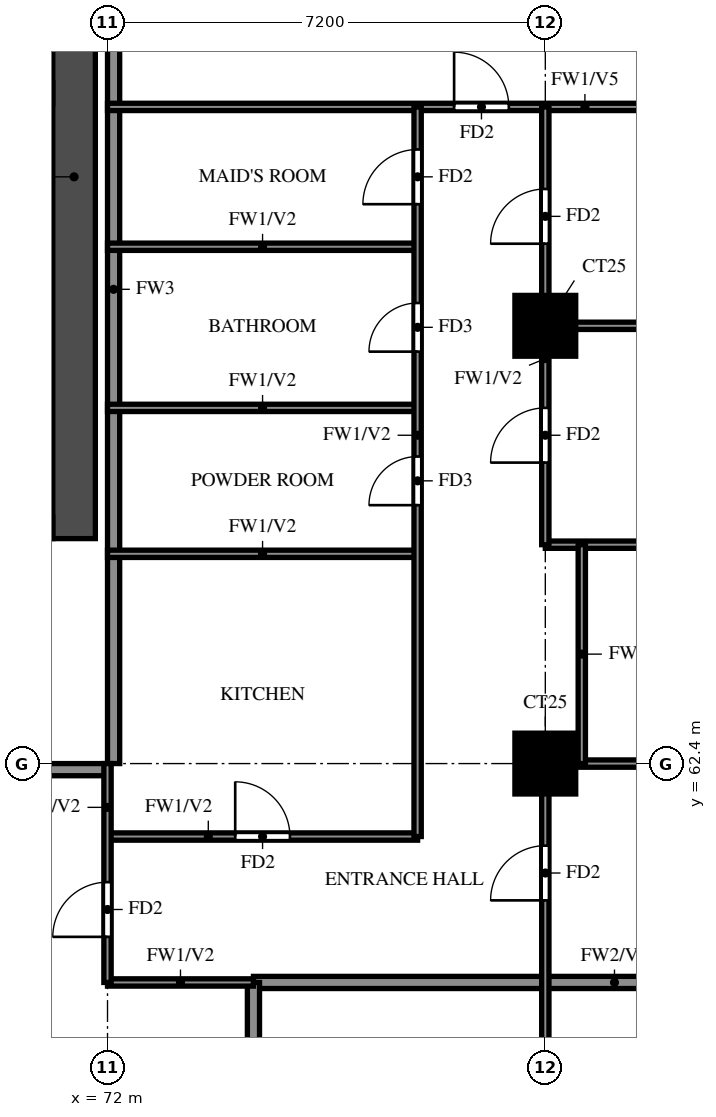
"""IFC4 building model, lengths in metres.
Left out: names, types, materials, properties, quantities, classifications, styles, units other than length and angle.
Written with IfcOpenShell. Run it as: python <this file> out.ifc"""

import sys

from ifc_helpers import new_model, si_unit, direction, frame, frame_2d, origin, origin_2d, place, context, subcontext, project, spatial, rectangle, extrude, source, transform, mapped, element, fill, save


model = new_model("IFC4")
c1 = context("Model", 3, precision=1e-05, world=origin(), true_north=direction((0.0, 1.0)))
c2 = subcontext(c1, "Body", "Model", "MODEL_VIEW")
j1 = project(units=[si_unit("LENGTHUNIT", "METRE"), si_unit("PLANEANGLEUNIT", "RADIAN")], contexts=[c1])
p1 = place(None, origin())
s1 = spatial("IfcSite", under=j1, at=p1, CompositionType="ELEMENT")
p2 = place(p1, origin())
s2 = spatial("IfcBuilding", under=s1, at=p2, CompositionType="ELEMENT")
p3 = place(p2, frame((0.0, 0.0, 143.0)))
s3 = spatial("IfcBuildingStorey", under=s2, at=p3, CompositionType="ELEMENT", Elevation=143.0)
m1 = source(origin(), c2, "Body", "SweptSolid", [
    extrude(rectangle(XDim=1.0, YDim=1.0, at=origin_2d()), origin(), (0.0, 0.0, 1.0), 3.2),
])
for number, where, z_axis, x_axis in (
    (1, (79.2, 62.4, 0.0), (0.0, 0.0, 1.0), (1.0, 0.0, 0.0)),
    (2, (79.2, 69.6, 0.0), (0.0, 0.0, 1.0), (1.0, 0.0, 0.0)),
):
    element("IfcColumn", number, at=place(p3, frame(where, z_axis=z_axis, x_axis=x_axis)), inside=s3, PredefinedType="COLUMN", context=c2, shape_type="MappedRepresentation", body=[
        mapped(m1, transform((0.0, 0.0, 0.0))),
    ])
p4 = place(p3, frame((71.45, 66.1, 0.0), z_axis=(0.0, 0.0, 1.0), x_axis=(0.0, 1.0, 0.0)))
e3 = element("IfcWall", 3, at=p4, inside=s3, PredefinedType="SHEAR", context=c2, shape_type="SweptSolid", body=[
    extrude(rectangle(XDim=11.9, YDim=0.7, at=frame_2d((5.95, 0.0))), origin(), (0.0, 0.0, 1.0), 3.2),
])
p5 = place(p3, frame((29.7, 66.275, 0.0), z_axis=(0.0, 0.0, 1.0), x_axis=(1.0, 0.0, 0.0)))
e4 = element("IfcWall", 4, at=p5, inside=s3, PredefinedType="SHEAR", context=c2, shape_type="SweptSolid", body=[
    extrude(rectangle(XDim=41.4, YDim=0.35, at=frame_2d((20.7, 0.0))), origin(), (0.0, 0.0, 1.0), 3.2),
])
p6 = place(p5, frame((0.925, 0.0, 0.0)))
e5 = element("IfcOpeningElement", 5, at=p6, cuts=e4, PredefinedType="OPENING", context=c2, shape_type="SweptSolid", body=[
    extrude(rectangle(XDim=1.1, YDim=2.1, at=frame_2d((0.55, 1.05))), frame((0.0, 0.185, 0.0), z_axis=(0.0, -1.0, 0.0), x_axis=(1.0, 0.0, 0.0)), (0.0, 0.0, 1.0), 0.37),
])
p7 = place(p5, frame((3.712, 0.0, 0.0)))
e6 = element("IfcOpeningElement", 6, at=p7, cuts=e4, PredefinedType="OPENING", context=c2, shape_type="SweptSolid", body=[
    extrude(rectangle(XDim=1.8, YDim=2.1, at=frame_2d((0.9, 1.05))), frame((0.0, 0.185, 0.0), z_axis=(0.0, -1.0, 0.0), x_axis=(1.0, 0.0, 0.0)), (0.0, 0.0, 1.0), 0.37),
])
p8 = place(p3, frame((67.2, 62.3, 0.0), z_axis=(0.0, 0.0, 1.0), x_axis=(1.0, 0.0, 0.0)))
e7 = element("IfcWall", 7, at=p8, inside=s3, PredefinedType="SOLIDWALL", context=c2, shape_type="SweptSolid", body=[
    extrude(rectangle(XDim=4.8, YDim=0.2, at=frame_2d((2.4, 0.0))), origin(), (0.0, 0.0, 1.0), 3.2),
])
p9 = place(p3, frame((72.1, 62.4, 0.0), z_axis=(0.0, 0.0, 1.0), x_axis=(0.0, 1.0, 0.0)))
e8 = element("IfcWall", 8, at=p9, inside=s3, PredefinedType="SOLIDWALL", context=c2, shape_type="SweptSolid", body=[
    extrude(rectangle(XDim=15.6, YDim=0.2, at=frame_2d((7.8, 0.0))), origin(), (0.0, 0.0, 1.0), 3.2),
])
p10 = place(p3, frame((74.4, 58.8, 0.0), z_axis=(0.0, 0.0, 1.0), x_axis=(1.0, 0.0, 0.0)))
e9 = element("IfcWall", 9, at=p10, inside=s3, PredefinedType="SOLIDWALL", context=c2, shape_type="SweptSolid", body=[
    extrude(rectangle(XDim=11.875, YDim=0.2, at=frame_2d((5.938, 0.0))), origin(), (0.0, 0.0, 1.0), 2.3),
])
p11 = place(p3, frame((74.4, 56.4, 0.0), z_axis=(0.0, 0.0, 1.0), x_axis=(0.0, 1.0, 0.0)))
e10 = element("IfcWall", 10, at=p11, inside=s3, PredefinedType="SOLIDWALL", context=c2, shape_type="SweptSolid", body=[
    extrude(rectangle(XDim=2.4, YDim=0.2, at=frame_2d((1.2, 0.0))), origin(), (0.0, 0.0, 1.0), 3.2),
])
p12 = place(p3, frame((72.0, 58.8, 0.0), z_axis=(0.0, 0.0, 1.0), x_axis=(1.0, 0.0, 0.0)))
e11 = element("IfcWall", 11, at=p12, inside=s3, PredefinedType="PARTITIONING", context=c2, shape_type="SweptSolid", body=[
    extrude(rectangle(XDim=2.4, YDim=0.12, at=frame_2d((1.2, 0.0))), origin(), (0.0, 0.0, 1.0), 3.2),
])
p13 = place(p3, frame((72.0, 61.2, 0.0), z_axis=(0.0, 0.0, 1.0), x_axis=(1.0, 0.0, 0.0)))
e12 = element("IfcWall", 12, at=p13, inside=s3, PredefinedType="PARTITIONING", context=c2, shape_type="SweptSolid", body=[
    extrude(rectangle(XDim=5.1, YDim=0.12, at=frame_2d((2.55, 0.0))), origin(), (0.0, 0.0, 1.0), 3.2),
])
p14 = place(p13, frame((2.1, 0.0, 0.0)))
e13 = element("IfcOpeningElement", 13, at=p14, cuts=e12, PredefinedType="OPENING", context=c2, shape_type="SweptSolid", body=[
    extrude(rectangle(XDim=0.9, YDim=2.1, at=frame_2d((0.45, 1.05))), frame((0.0, 0.07, 0.0), z_axis=(0.0, -1.0, 0.0), x_axis=(1.0, 0.0, 0.0)), (0.0, 0.0, 1.0), 0.14),
])
p15 = place(p3, frame((79.2, 62.4, 0.0), z_axis=(0.0, 0.0, 1.0), x_axis=(1.0, 0.0, 0.0)))
e14 = element("IfcWall", 14, at=p15, inside=s3, PredefinedType="PARTITIONING", context=c2, shape_type="SweptSolid", body=[
    extrude(rectangle(XDim=7.075, YDim=0.12, at=frame_2d((3.538, 0.0))), origin(), (0.0, 0.0, 1.0), 3.2),
])
p16 = place(p15, frame((3.438, 0.0, 0.0)))
e15 = element("IfcOpeningElement", 15, at=p16, cuts=e14, PredefinedType="OPENING", context=c2, shape_type="SweptSolid", body=[
    extrude(rectangle(XDim=0.8, YDim=2.1, at=frame_2d((0.4, 1.05))), frame((0.0, 0.07, 0.0), z_axis=(0.0, -1.0, 0.0), x_axis=(1.0, 0.0, 0.0)), (0.0, 0.0, 1.0), 0.14),
])
p17 = place(p3, frame((72.0, 65.85, 0.0), z_axis=(0.0, 0.0, 1.0), x_axis=(1.0, 0.0, 0.0)))
e16 = element("IfcWall", 16, at=p17, inside=s3, PredefinedType="PARTITIONING", context=c2, shape_type="SweptSolid", body=[
    extrude(rectangle(XDim=5.1, YDim=0.12, at=frame_2d((2.55, 0.0))), origin(), (0.0, 0.0, 1.0), 3.2),
])
p18 = place(p3, frame((79.2, 66.0, 0.0), z_axis=(0.0, 0.0, 1.0), x_axis=(1.0, 0.0, 0.0)))
e17 = element("IfcWall", 17, at=p18, inside=s3, PredefinedType="PARTITIONING", context=c2, shape_type="SweptSolid", body=[
    extrude(rectangle(XDim=7.075, YDim=0.12, at=frame_2d((3.538, 0.0))), origin(), (0.0, 0.0, 1.0), 2.3),
])
p19 = place(p3, frame((72.0, 68.25, 0.0), z_axis=(0.0, 0.0, 1.0), x_axis=(1.0, 0.0, 0.0)))
e18 = element("IfcWall", 18, at=p19, inside=s3, PredefinedType="PARTITIONING", context=c2, shape_type="SweptSolid", body=[
    extrude(rectangle(XDim=5.1, YDim=0.12, at=frame_2d((2.55, 0.0))), origin(), (0.0, 0.0, 1.0), 3.2),
])
p20 = place(p3, frame((79.2, 69.6, 0.0), z_axis=(0.0, 0.0, 1.0), x_axis=(1.0, 0.0, 0.0)))
e19 = element("IfcWall", 19, at=p20, inside=s3, PredefinedType="PARTITIONING", context=c2, shape_type="SweptSolid", body=[
    extrude(rectangle(XDim=7.075, YDim=0.12, at=frame_2d((3.538, 0.0))), origin(), (0.0, 0.0, 1.0), 3.2),
])
p21 = place(p3, frame((72.0, 70.9, 0.0), z_axis=(0.0, 0.0, 1.0), x_axis=(1.0, 0.0, 0.0)))
e20 = element("IfcWall", 20, at=p21, inside=s3, PredefinedType="PARTITIONING", context=c2, shape_type="SweptSolid", body=[
    extrude(rectangle(XDim=5.1, YDim=0.12, at=frame_2d((2.55, 0.0))), origin(), (0.0, 0.0, 1.0), 3.2),
])
p22 = place(p3, frame((72.0, 73.2, 0.0), z_axis=(0.0, 0.0, 1.0), x_axis=(1.0, 0.0, 0.0)))
e21 = element("IfcWall", 21, at=p22, inside=s3, PredefinedType="PARTITIONING", context=c2, shape_type="SweptSolid", body=[
    extrude(rectangle(XDim=14.275, YDim=0.12, at=frame_2d((7.137, 0.0))), origin(), (0.0, 0.0, 1.0), 2.3),
])
p23 = place(p22, frame((5.7, 0.0, 0.0)))
e22 = element("IfcOpeningElement", 22, at=p23, cuts=e21, PredefinedType="OPENING", context=c2, shape_type="SweptSolid", body=[
    extrude(rectangle(XDim=0.9, YDim=2.1, at=frame_2d((0.45, 1.05))), frame((0.0, 0.07, 0.0), z_axis=(0.0, -1.0, 0.0), x_axis=(1.0, 0.0, 0.0)), (0.0, 0.0, 1.0), 0.14),
])
p24 = place(p3, frame((72.0, 58.8, 0.0), z_axis=(0.0, 0.0, 1.0), x_axis=(0.0, 1.0, 0.0)))
e23 = element("IfcWall", 23, at=p24, inside=s3, PredefinedType="PARTITIONING", context=c2, shape_type="SweptSolid", body=[
    extrude(rectangle(XDim=3.6, YDim=0.12, at=frame_2d((1.8, 0.0))), origin(), (0.0, 0.0, 1.0), 3.2),
])
p25 = place(p24, frame((0.75, 0.0, 0.0)))
e24 = element("IfcOpeningElement", 24, at=p25, cuts=e23, PredefinedType="OPENING", context=c2, shape_type="SweptSolid", body=[
    extrude(rectangle(XDim=0.9, YDim=2.1, at=frame_2d((0.45, 1.05))), frame((0.0, 0.07, 0.0), z_axis=(0.0, -1.0, 0.0), x_axis=(1.0, 0.0, 0.0)), (0.0, 0.0, 1.0), 0.14),
])
p26 = place(p3, frame((77.1, 61.2, 0.0), z_axis=(0.0, 0.0, 1.0), x_axis=(0.0, 1.0, 0.0)))
e25 = element("IfcWall", 25, at=p26, inside=s3, PredefinedType="PARTITIONING", context=c2, shape_type="SweptSolid", body=[
    extrude(rectangle(XDim=12.0, YDim=0.12, at=frame_2d((6.0, 0.0))), origin(), (0.0, 0.0, 1.0), 3.2),
])
p27 = place(p26, frame((5.45, 0.0, 0.0)))
e26 = element("IfcOpeningElement", 26, at=p27, cuts=e25, PredefinedType="OPENING", context=c2, shape_type="SweptSolid", body=[
    extrude(rectangle(XDim=0.8, YDim=2.1, at=frame_2d((0.4, 1.05))), frame((0.0, 0.07, 0.0), z_axis=(0.0, -1.0, 0.0), x_axis=(1.0, 0.0, 0.0)), (0.0, 0.0, 1.0), 0.14),
])
p28 = place(p26, frame((7.975, 0.0, 0.0)))
e27 = element("IfcOpeningElement", 27, at=p28, cuts=e25, PredefinedType="OPENING", context=c2, shape_type="SweptSolid", body=[
    extrude(rectangle(XDim=0.8, YDim=2.1, at=frame_2d((0.4, 1.05))), frame((0.0, 0.07, 0.0), z_axis=(0.0, -1.0, 0.0), x_axis=(1.0, 0.0, 0.0)), (0.0, 0.0, 1.0), 0.14),
])
p29 = place(p26, frame((10.4, 0.0, 0.0)))
e28 = element("IfcOpeningElement", 28, at=p29, cuts=e25, PredefinedType="OPENING", context=c2, shape_type="SweptSolid", body=[
    extrude(rectangle(XDim=0.9, YDim=2.1, at=frame_2d((0.45, 1.05))), frame((0.0, 0.07, 0.0), z_axis=(0.0, -1.0, 0.0), x_axis=(1.0, 0.0, 0.0)), (0.0, 0.0, 1.0), 0.14),
])
p30 = place(p3, frame((79.2, 48.125, 0.0), z_axis=(0.0, 0.0, 1.0), x_axis=(0.0, 1.0, 0.0)))
e29 = element("IfcWall", 29, at=p30, inside=s3, PredefinedType="PARTITIONING", context=c2, shape_type="SweptSolid", body=[
    extrude(rectangle(XDim=14.275, YDim=0.12, at=frame_2d((7.137, 0.0))), origin(), (0.0, 0.0, 1.0), 3.2),
])
p31 = place(p30, frame((1.288, 0.0, 0.0)))
e30 = element("IfcOpeningElement", 30, at=p31, cuts=e29, PredefinedType="OPENING", context=c2, shape_type="SweptSolid", body=[
    extrude(rectangle(XDim=0.9, YDim=2.1, at=frame_2d((0.45, 1.05))), frame((0.0, 0.07, 0.0), z_axis=(0.0, -1.0, 0.0), x_axis=(1.0, 0.0, 0.0)), (0.0, 0.0, 1.0), 0.14),
])
p32 = place(p30, frame((7.825, 0.0, 0.0)))
e31 = element("IfcOpeningElement", 31, at=p32, cuts=e29, PredefinedType="OPENING", context=c2, shape_type="SweptSolid", body=[
    extrude(rectangle(XDim=1.5, YDim=2.1, at=frame_2d((0.75, 1.05))), frame((0.0, 0.07, 0.0), z_axis=(0.0, -1.0, 0.0), x_axis=(1.0, 0.0, 0.0)), (0.0, 0.0, 1.0), 0.14),
])
p33 = place(p30, frame((12.025, 0.0, 0.0)))
e32 = element("IfcOpeningElement", 32, at=p33, cuts=e29, PredefinedType="OPENING", context=c2, shape_type="SweptSolid", body=[
    extrude(rectangle(XDim=0.9, YDim=2.1, at=frame_2d((0.45, 1.05))), frame((0.0, 0.07, 0.0), z_axis=(0.0, -1.0, 0.0), x_axis=(1.0, 0.0, 0.0)), (0.0, 0.0, 1.0), 0.14),
])
p34 = place(p3, frame((79.2, 66.0, 0.0), z_axis=(0.0, 0.0, 1.0), x_axis=(0.0, 1.0, 0.0)))
e33 = element("IfcWall", 33, at=p34, inside=s3, PredefinedType="PARTITIONING", context=c2, shape_type="SweptSolid", body=[
    extrude(rectangle(XDim=7.2, YDim=0.12, at=frame_2d((3.6, 0.0))), origin(), (0.0, 0.0, 1.0), 3.2),
])
p35 = place(p34, frame((1.35, 0.0, 0.0)))
e34 = element("IfcOpeningElement", 34, at=p35, cuts=e33, PredefinedType="OPENING", context=c2, shape_type="SweptSolid", body=[
    extrude(rectangle(XDim=0.9, YDim=2.1, at=frame_2d((0.45, 1.05))), frame((0.0, 0.07, 0.0), z_axis=(0.0, -1.0, 0.0), x_axis=(1.0, 0.0, 0.0)), (0.0, 0.0, 1.0), 0.14),
])
p36 = place(p34, frame((4.95, 0.0, 0.0)))
e35 = element("IfcOpeningElement", 35, at=p36, cuts=e33, PredefinedType="OPENING", context=c2, shape_type="SweptSolid", body=[
    extrude(rectangle(XDim=0.9, YDim=2.1, at=frame_2d((0.45, 1.05))), frame((0.0, 0.07, 0.0), z_axis=(0.0, -1.0, 0.0), x_axis=(1.0, 0.0, 0.0)), (0.0, 0.0, 1.0), 0.14),
])
p37 = place(p3, frame((79.8, 62.4, 0.0), z_axis=(0.0, 0.0, 1.0), x_axis=(0.0, 1.0, 0.0)))
e36 = element("IfcWall", 36, at=p37, inside=s3, PredefinedType="PARTITIONING", context=c2, shape_type="SweptSolid", body=[
    extrude(rectangle(XDim=3.6, YDim=0.12, at=frame_2d((1.8, 0.0))), origin(), (0.0, 0.0, 1.0), 3.2),
])
p38 = place(p25, origin())
e37 = element("IfcDoor", 37, at=p38, inside=s3, OperationType="SINGLE_SWING_RIGHT", PredefinedType="DOOR", context=c2, shape_type="SweptSolid", body=[
    extrude(rectangle(XDim=0.9, YDim=2.1, at=frame_2d((0.45, 1.05))), frame((0.0, 0.025, 0.0), z_axis=(0.0, -1.0, 0.0), x_axis=(1.0, 0.0, 0.0)), (0.0, 0.0, 1.0), 0.05),
])
fill(e24, e37)
p39 = place(p33, origin())
e38 = element("IfcDoor", 38, at=p39, inside=s3, OperationType="SINGLE_SWING_LEFT", PredefinedType="DOOR", context=c2, shape_type="SweptSolid", body=[
    extrude(rectangle(XDim=0.9, YDim=2.1, at=frame_2d((0.45, 1.05))), frame((0.0, 0.025, 0.0), z_axis=(0.0, -1.0, 0.0), x_axis=(1.0, 0.0, 0.0)), (0.0, 0.0, 1.0), 0.05),
])
fill(e32, e38)
p40 = place(p35, origin())
e39 = element("IfcDoor", 39, at=p40, inside=s3, OperationType="SINGLE_SWING_LEFT", PredefinedType="DOOR", context=c2, shape_type="SweptSolid", body=[
    extrude(rectangle(XDim=0.9, YDim=2.1, at=frame_2d((0.45, 1.05))), frame((0.0, 0.025, 0.0), z_axis=(0.0, -1.0, 0.0), x_axis=(1.0, 0.0, 0.0)), (0.0, 0.0, 1.0), 0.05),
])
fill(e34, e39)
p41 = place(p36, origin())
e40 = element("IfcDoor", 40, at=p41, inside=s3, OperationType="SINGLE_SWING_LEFT", PredefinedType="DOOR", context=c2, shape_type="SweptSolid", body=[
    extrude(rectangle(XDim=0.9, YDim=2.1, at=frame_2d((0.45, 1.05))), frame((0.0, 0.025, 0.0), z_axis=(0.0, -1.0, 0.0), x_axis=(1.0, 0.0, 0.0)), (0.0, 0.0, 1.0), 0.05),
])
fill(e35, e40)
p42 = place(p23, origin())
e41 = element("IfcDoor", 41, at=p42, inside=s3, OperationType="SINGLE_SWING_RIGHT", PredefinedType="DOOR", context=c2, shape_type="SweptSolid", body=[
    extrude(rectangle(XDim=0.9, YDim=2.1, at=frame_2d((0.45, 1.05))), frame((0.0, 0.025, 0.0), z_axis=(0.0, -1.0, 0.0), x_axis=(1.0, 0.0, 0.0)), (0.0, 0.0, 1.0), 0.05),
])
fill(e22, e41)
p43 = place(p14, origin())
e42 = element("IfcDoor", 42, at=p43, inside=s3, OperationType="SINGLE_SWING_LEFT", PredefinedType="DOOR", context=c2, shape_type="SweptSolid", body=[
    extrude(rectangle(XDim=0.9, YDim=2.1, at=frame_2d((0.45, 1.05))), frame((0.0, 0.025, 0.0), z_axis=(0.0, -1.0, 0.0), x_axis=(1.0, 0.0, 0.0)), (0.0, 0.0, 1.0), 0.05),
])
fill(e13, e42)
p44 = place(p27, origin())
e43 = element("IfcDoor", 43, at=p44, inside=s3, OperationType="SINGLE_SWING_LEFT", PredefinedType="DOOR", context=c2, shape_type="SweptSolid", body=[
    extrude(rectangle(XDim=0.8, YDim=2.1, at=frame_2d((0.4, 1.05))), frame((0.0, 0.025, 0.0), z_axis=(0.0, -1.0, 0.0), x_axis=(1.0, 0.0, 0.0)), (0.0, 0.0, 1.0), 0.05),
])
fill(e26, e43)
p45 = place(p28, origin())
e44 = element("IfcDoor", 44, at=p45, inside=s3, OperationType="SINGLE_SWING_RIGHT", PredefinedType="DOOR", context=c2, shape_type="SweptSolid", body=[
    extrude(rectangle(XDim=0.8, YDim=2.1, at=frame_2d((0.4, 1.05))), frame((0.0, 0.025, 0.0), z_axis=(0.0, -1.0, 0.0), x_axis=(1.0, 0.0, 0.0)), (0.0, 0.0, 1.0), 0.05),
])
fill(e27, e44)
p46 = place(p29, origin())
e45 = element("IfcDoor", 45, at=p46, inside=s3, OperationType="SINGLE_SWING_LEFT", PredefinedType="DOOR", context=c2, shape_type="SweptSolid", body=[
    extrude(rectangle(XDim=0.9, YDim=2.1, at=frame_2d((0.45, 1.05))), frame((0.0, 0.025, 0.0), z_axis=(0.0, -1.0, 0.0), x_axis=(1.0, 0.0, 0.0)), (0.0, 0.0, 1.0), 0.05),
])
fill(e28, e45)
save(model, sys.argv[1])
